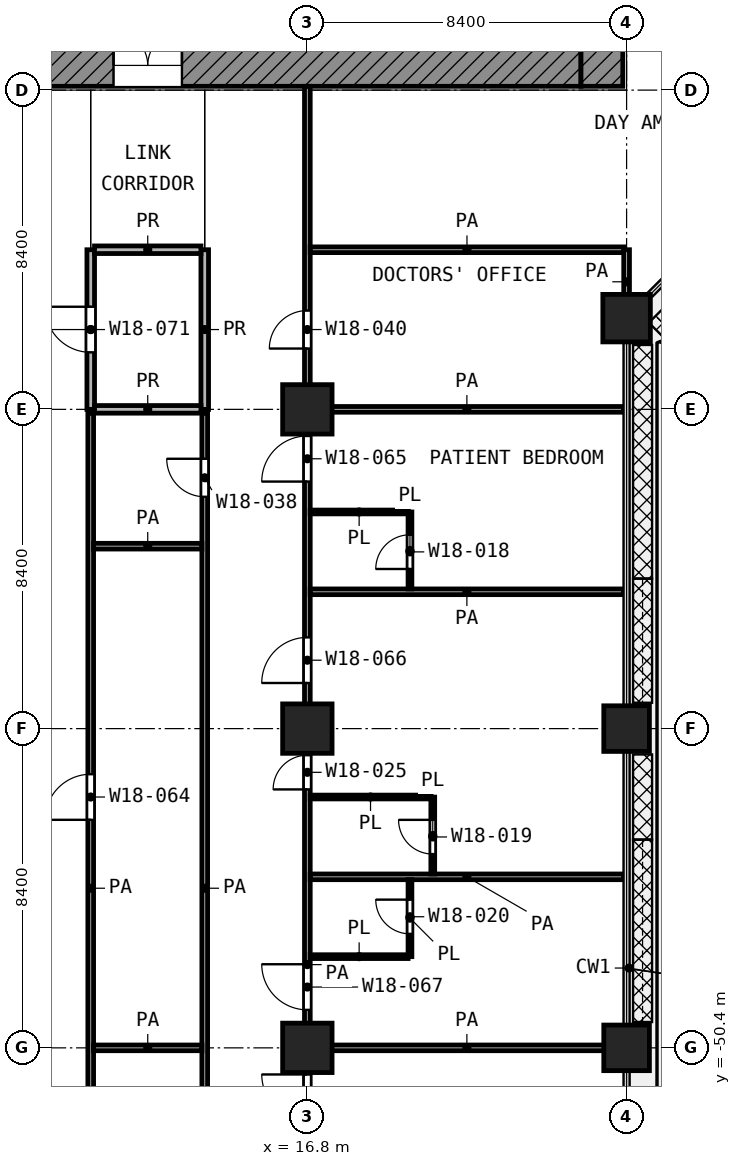
"""IFC4 building model, lengths in metres.
Left out: names, types, materials, properties, quantities, classifications, styles, units other than length and angle.
Written with IfcOpenShell. Run it as: python <this file> out.ifc"""

import sys

from ifc_helpers import new_model, si_unit, direction, frame, frame_2d, origin, origin_2d, place, context, subcontext, project, spatial, rectangle, extrude, element, fill, save


model = new_model("IFC4")
c1 = context("Model", 3, precision=1e-05, world=origin(), true_north=direction((0.0, 1.0)))
c2 = subcontext(c1, "Body", "Model", "MODEL_VIEW")
j1 = project(units=[si_unit("LENGTHUNIT", "METRE"), si_unit("PLANEANGLEUNIT", "RADIAN")], contexts=[c1])
p1 = place(None, origin())
s1 = spatial("IfcSite", under=j1, at=p1, CompositionType="ELEMENT")
p2 = place(p1, origin())
s2 = spatial("IfcBuilding", under=s1, at=p2, CompositionType="ELEMENT")
p3 = place(p2, frame((0.0, 0.0, 81.2)))
s3 = spatial("IfcBuildingStorey", under=s2, at=p3, CompositionType="ELEMENT", Elevation=81.2)
p4 = place(p3, frame((25.2, -31.2, 0.0), z_axis=(0.0, 0.0, 1.0), x_axis=(1.0, 0.0, 0.0)))
e1 = element("IfcColumn", 1, at=p4, inside=s3, PredefinedType="COLUMN", context=c2, shape_type="SweptSolid", body=[
    extrude(rectangle(XDim=1.25, YDim=1.25, at=origin_2d()), origin(), (0.0, 0.0, 1.0), 4.2),
])
for number, where, z_axis, x_axis in (
    (2, (16.8, -33.6, 0.0), (0.0, 0.0, 1.0), (1.0, 0.0, 0.0)),
    (3, (16.8, -42.0, 0.0), (0.0, 0.0, 1.0), (1.0, 0.0, 0.0)),
):
    element("IfcColumn", number, at=place(p3, frame(where, z_axis=z_axis, x_axis=x_axis)), inside=s3, PredefinedType="COLUMN", context=c2, shape_type="SweptSolid", body=[
        extrude(rectangle(XDim=1.3, YDim=1.3, at=origin_2d()), origin(), (0.0, 0.0, 1.0), 4.2),
    ])
p5 = place(p3, frame((25.2, -42.0, 0.0), z_axis=(0.0, 0.0, 1.0), x_axis=(1.0, 0.0, 0.0)))
e4 = element("IfcColumn", 4, at=p5, inside=s3, PredefinedType="COLUMN", context=c2, shape_type="SweptSolid", body=[
    extrude(rectangle(XDim=1.2, YDim=1.2, at=origin_2d()), origin(), (0.0, 0.0, 1.0), 4.2),
])
p6 = place(p3, frame((16.8, -50.4, 0.0), z_axis=(0.0, 0.0, 1.0), x_axis=(1.0, 0.0, 0.0)))
e5 = element("IfcColumn", 5, at=p6, inside=s3, PredefinedType="COLUMN", context=c2, shape_type="SweptSolid", body=[
    extrude(rectangle(XDim=1.3, YDim=1.3, at=origin_2d()), origin(), (0.0, 0.0, 1.0), 4.2),
])
p7 = place(p3, frame((25.2, -50.4, 0.0), z_axis=(0.0, 0.0, 1.0), x_axis=(1.0, 0.0, 0.0)))
e6 = element("IfcColumn", 6, at=p7, inside=s3, PredefinedType="COLUMN", context=c2, shape_type="SweptSolid", body=[
    extrude(rectangle(XDim=1.2, YDim=1.2, at=origin_2d()), origin(), (0.0, 0.0, 1.0), 4.2),
])
p8 = place(p3, frame((5.4, -24.55, 0.0), z_axis=(0.0, 0.0, 1.0), x_axis=(1.0, 0.0, 0.0)))
e7 = element("IfcWall", 7, at=p8, inside=s3, PredefinedType="SHEAR", context=c2, shape_type="SweptSolid", body=[
    extrude(rectangle(XDim=18.6, YDim=1.1, at=frame_2d((9.3, 0.0))), origin(), (0.0, 0.0, 1.0), 3.9),
])
p9 = place(p8, frame((6.3, 0.0, 0.0)))
e8 = element("IfcOpeningElement", 8, at=p9, cuts=e7, PredefinedType="OPENING", context=c2, shape_type="SweptSolid", body=[
    extrude(rectangle(XDim=1.8, YDim=2.1, at=frame_2d((0.9, 1.05))), frame((0.0, 0.56, 0.0), z_axis=(0.0, -1.0, 0.0), x_axis=(1.0, 0.0, 0.0)), (0.0, 0.0, 1.0), 1.12),
])
p10 = place(p3, frame((24.55, -25.1, 0.0), z_axis=(0.0, 0.0, 1.0), x_axis=(0.0, 1.0, 0.0)))
e9 = element("IfcWall", 9, at=p10, inside=s3, PredefinedType="SHEAR", context=c2, shape_type="SweptSolid", body=[
    extrude(rectangle(XDim=1.1, YDim=1.1, at=frame_2d((0.55, 0.0))), origin(), (0.0, 0.0, 1.0), 3.9),
])
p11 = place(p3, frame((16.875, -48.0, 0.0), z_axis=(0.0, 0.0, 1.0), x_axis=(1.0, 0.0, 0.0)))
e10 = element("IfcWall", 10, at=p11, inside=s3, PredefinedType="PARTITIONING", context=c2, shape_type="SweptSolid", body=[
    extrude(rectangle(XDim=2.575, YDim=0.1, at=frame_2d((1.288, 0.0))), origin(), (0.0, 0.0, 1.0), 3.9),
])
p12 = place(p3, frame((16.875, -43.8, 0.0), z_axis=(0.0, 0.0, 1.0), x_axis=(1.0, 0.0, 0.0)))
e11 = element("IfcWall", 11, at=p12, inside=s3, PredefinedType="PARTITIONING", context=c2, shape_type="SweptSolid", body=[
    extrude(rectangle(XDim=3.174, YDim=0.1, at=frame_2d((1.587, 0.0))), origin(), (0.0, 0.0, 1.0), 3.9),
])
p13 = place(p3, frame((16.875, -36.3, 0.0), z_axis=(0.0, 0.0, 1.0), x_axis=(1.0, 0.0, 0.0)))
e12 = element("IfcWall", 12, at=p13, inside=s3, PredefinedType="PARTITIONING", context=c2, shape_type="SweptSolid", body=[
    extrude(rectangle(XDim=2.575, YDim=0.1, at=frame_2d((1.288, 0.0))), origin(), (0.0, 0.0, 1.0), 3.9),
])
p14 = place(p3, frame((19.5, -48.0, 0.0), z_axis=(0.0, 0.0, 1.0), x_axis=(0.0, 1.0, 0.0)))
e13 = element("IfcWall", 13, at=p14, inside=s3, PredefinedType="PARTITIONING", context=c2, shape_type="SweptSolid", body=[
    extrude(rectangle(XDim=2.025, YDim=0.1, at=frame_2d((1.012, 0.0))), origin(), (0.0, 0.0, 1.0), 3.9),
])
p15 = place(p14, frame((0.6, 0.0, 0.0)))
e14 = element("IfcOpeningElement", 14, at=p15, cuts=e13, PredefinedType="OPENING", context=c2, shape_type="SweptSolid", body=[
    extrude(rectangle(XDim=0.9, YDim=2.1, at=frame_2d((0.45, 1.05))), frame((0.0, 0.06, 0.0), z_axis=(0.0, -1.0, 0.0), x_axis=(1.0, 0.0, 0.0)), (0.0, 0.0, 1.0), 0.12),
])
p16 = place(p3, frame((19.5, -38.325, 0.0), z_axis=(0.0, 0.0, 1.0), x_axis=(0.0, 1.0, 0.0)))
e15 = element("IfcWall", 15, at=p16, inside=s3, PredefinedType="PARTITIONING", context=c2, shape_type="SweptSolid", body=[
    extrude(rectangle(XDim=2.025, YDim=0.1, at=frame_2d((1.012, 0.0))), origin(), (0.0, 0.0, 1.0), 3.9),
])
p17 = place(p16, frame((0.525, 0.0, 0.0)))
e16 = element("IfcOpeningElement", 16, at=p17, cuts=e15, PredefinedType="OPENING", context=c2, shape_type="SweptSolid", body=[
    extrude(rectangle(XDim=0.9, YDim=2.1, at=frame_2d((0.45, 1.05))), frame((0.0, 0.06, 0.0), z_axis=(0.0, -1.0, 0.0), x_axis=(1.0, 0.0, 0.0)), (0.0, 0.0, 1.0), 0.12),
])
p18 = place(p3, frame((20.1, -45.825, 0.0), z_axis=(0.0, 0.0, 1.0), x_axis=(0.0, 1.0, 0.0)))
e17 = element("IfcWall", 17, at=p18, inside=s3, PredefinedType="PARTITIONING", context=c2, shape_type="SweptSolid", body=[
    extrude(rectangle(XDim=2.023, YDim=0.1, at=frame_2d((1.011, 0.0))), origin(), (0.0, 0.0, 1.0), 3.9),
])
p19 = place(p18, frame((0.524, 0.0, 0.0)))
e18 = element("IfcOpeningElement", 18, at=p19, cuts=e17, PredefinedType="OPENING", context=c2, shape_type="SweptSolid", body=[
    extrude(rectangle(XDim=0.9, YDim=2.1, at=frame_2d((0.45, 1.05))), frame((0.0, 0.06, 0.0), z_axis=(0.0, -1.0, 0.0), x_axis=(1.0, 0.0, 0.0)), (0.0, 0.0, 1.0), 0.12),
])
p20 = place(p3, frame((11.175, -50.4, 0.0), z_axis=(0.0, 0.0, 1.0), x_axis=(1.0, 0.0, 0.0)))
e19 = element("IfcWall", 19, at=p20, inside=s3, PredefinedType="PARTITIONING", context=c2, shape_type="SweptSolid", body=[
    extrude(rectangle(XDim=2.85, YDim=0.15, at=frame_2d((1.425, 0.0))), origin(), (0.0, 0.0, 1.0), 3.9),
])
for number, where, z_axis, x_axis in (
    (20, (16.875, -50.4, 0.0), (0.0, 0.0, 1.0), (1.0, 0.0, 0.0)),
    (21, (16.875, -45.9, 0.0), (0.0, 0.0, 1.0), (1.0, 0.0, 0.0)),
    (22, (16.875, -38.4, 0.0), (0.0, 0.0, 1.0), (1.0, 0.0, 0.0)),
):
    element("IfcWall", number, at=place(p3, frame(where, z_axis=z_axis, x_axis=x_axis)), inside=s3, PredefinedType="PARTITIONING", context=c2, shape_type="SweptSolid", body=[
        extrude(rectangle(XDim=8.245, YDim=0.15, at=frame_2d((4.123, 0.0))), origin(), (0.0, 0.0, 1.0), 3.9),
    ])
p21 = place(p3, frame((11.175, -37.2, 0.0), z_axis=(0.0, 0.0, 1.0), x_axis=(1.0, 0.0, 0.0)))
e23 = element("IfcWall", 23, at=p21, inside=s3, PredefinedType="PARTITIONING", context=c2, shape_type="SweptSolid", body=[
    extrude(rectangle(XDim=2.85, YDim=0.15, at=frame_2d((1.425, 0.0))), origin(), (0.0, 0.0, 1.0), 3.9),
])
p22 = place(p3, frame((16.875, -33.6, 0.0), z_axis=(0.0, 0.0, 1.0), x_axis=(1.0, 0.0, 0.0)))
e24 = element("IfcWall", 24, at=p22, inside=s3, PredefinedType="PARTITIONING", context=c2, shape_type="SweptSolid", body=[
    extrude(rectangle(XDim=8.245, YDim=0.15, at=frame_2d((4.123, 0.0))), origin(), (0.0, 0.0, 1.0), 3.9),
])
p23 = place(p3, frame((16.875, -29.4, 0.0), z_axis=(0.0, 0.0, 1.0), x_axis=(1.0, 0.0, 0.0)))
e25 = element("IfcWall", 25, at=p23, inside=s3, PredefinedType="PARTITIONING", context=c2, shape_type="SweptSolid", body=[
    extrude(rectangle(XDim=8.25, YDim=0.15, at=frame_2d((4.125, 0.0))), origin(), (0.0, 0.0, 1.0), 3.9),
])
p24 = place(p3, frame((11.1, -58.7, 0.0), z_axis=(0.0, 0.0, 1.0), x_axis=(0.0, 1.0, 0.0)))
e26 = element("IfcWall", 26, at=p24, inside=s3, PredefinedType="PARTITIONING", context=c2, shape_type="SweptSolid", body=[
    extrude(rectangle(XDim=25.0, YDim=0.15, at=frame_2d((12.5, 0.0))), origin(), (0.0, 0.0, 1.0), 3.9),
])
p25 = place(p24, frame((14.3, 0.0, 0.0)))
e27 = element("IfcOpeningElement", 27, at=p25, cuts=e26, PredefinedType="OPENING", context=c2, shape_type="SweptSolid", body=[
    extrude(rectangle(XDim=1.2, YDim=2.1, at=frame_2d((0.6, 1.05))), frame((0.0, 0.085, 0.0), z_axis=(0.0, -1.0, 0.0), x_axis=(1.0, 0.0, 0.0)), (0.0, 0.0, 1.0), 0.17),
])
p26 = place(p24, frame((3.6, 0.0, 0.0)))
e28 = element("IfcOpeningElement", 28, at=p26, cuts=e26, PredefinedType="OPENING", context=c2, shape_type="SweptSolid", body=[
    extrude(rectangle(XDim=1.0, YDim=2.1, at=frame_2d((0.5, 1.05))), frame((0.0, 0.085, 0.0), z_axis=(0.0, -1.0, 0.0), x_axis=(1.0, 0.0, 0.0)), (0.0, 0.0, 1.0), 0.17),
])
p27 = place(p3, frame((14.1, -58.7, 0.0), z_axis=(0.0, 0.0, 1.0), x_axis=(0.0, 1.0, 0.0)))
e29 = element("IfcWall", 29, at=p27, inside=s3, PredefinedType="PARTITIONING", context=c2, shape_type="SweptSolid", body=[
    extrude(rectangle(XDim=25.0, YDim=0.15, at=frame_2d((12.5, 0.0))), origin(), (0.0, 0.0, 1.0), 3.9),
])
p28 = place(p27, frame((22.8, 0.0, 0.0)))
e30 = element("IfcOpeningElement", 30, at=p28, cuts=e29, PredefinedType="OPENING", context=c2, shape_type="SweptSolid", body=[
    extrude(rectangle(XDim=1.0, YDim=2.1, at=frame_2d((0.5, 1.05))), frame((0.0, 0.085, 0.0), z_axis=(0.0, -1.0, 0.0), x_axis=(1.0, 0.0, 0.0)), (0.0, 0.0, 1.0), 0.17),
])
p29 = place(p3, frame((16.8, -71.32, 0.0), z_axis=(0.0, 0.0, 1.0), x_axis=(0.0, 1.0, 0.0)))
e31 = element("IfcWall", 31, at=p29, inside=s3, PredefinedType="PARTITIONING", context=c2, shape_type="SweptSolid", body=[
    extrude(rectangle(XDim=46.22, YDim=0.15, at=frame_2d((23.11, 0.0))), origin(), (0.0, 0.0, 1.0), 3.9),
])
p30 = place(p29, frame((39.32, 0.0, 0.0)))
e32 = element("IfcOpeningElement", 32, at=p30, cuts=e31, PredefinedType="OPENING", context=c2, shape_type="SweptSolid", body=[
    extrude(rectangle(XDim=1.0, YDim=2.1, at=frame_2d((0.5, 1.05))), frame((0.0, 0.085, 0.0), z_axis=(0.0, -1.0, 0.0), x_axis=(1.0, 0.0, 0.0)), (0.0, 0.0, 1.0), 0.17),
])
p31 = place(p29, frame((35.82, 0.0, 0.0)))
e33 = element("IfcOpeningElement", 33, at=p31, cuts=e31, PredefinedType="OPENING", context=c2, shape_type="SweptSolid", body=[
    extrude(rectangle(XDim=1.2, YDim=2.1, at=frame_2d((0.6, 1.05))), frame((0.0, 0.085, 0.0), z_axis=(0.0, -1.0, 0.0), x_axis=(1.0, 0.0, 0.0)), (0.0, 0.0, 1.0), 0.17),
])
p32 = place(p29, frame((30.52, 0.0, 0.0)))
e34 = element("IfcOpeningElement", 34, at=p32, cuts=e31, PredefinedType="OPENING", context=c2, shape_type="SweptSolid", body=[
    extrude(rectangle(XDim=1.2, YDim=2.1, at=frame_2d((0.6, 1.05))), frame((0.0, 0.085, 0.0), z_axis=(0.0, -1.0, 0.0), x_axis=(1.0, 0.0, 0.0)), (0.0, 0.0, 1.0), 0.17),
])
p33 = place(p29, frame((27.72, 0.0, 0.0)))
e35 = element("IfcOpeningElement", 35, at=p33, cuts=e31, PredefinedType="OPENING", context=c2, shape_type="SweptSolid", body=[
    extrude(rectangle(XDim=0.9, YDim=2.1, at=frame_2d((0.45, 1.05))), frame((0.0, 0.085, 0.0), z_axis=(0.0, -1.0, 0.0), x_axis=(1.0, 0.0, 0.0)), (0.0, 0.0, 1.0), 0.17),
])
p34 = place(p29, frame((21.92, 0.0, 0.0)))
e36 = element("IfcOpeningElement", 36, at=p34, cuts=e31, PredefinedType="OPENING", context=c2, shape_type="SweptSolid", body=[
    extrude(rectangle(XDim=1.2, YDim=2.1, at=frame_2d((0.6, 1.05))), frame((0.0, 0.085, 0.0), z_axis=(0.0, -1.0, 0.0), x_axis=(1.0, 0.0, 0.0)), (0.0, 0.0, 1.0), 0.17),
])
p35 = place(p29, frame((19.02, 0.0, 0.0)))
e37 = element("IfcOpeningElement", 37, at=p35, cuts=e31, PredefinedType="OPENING", context=c2, shape_type="SweptSolid", body=[
    extrude(rectangle(XDim=1.2, YDim=2.1, at=frame_2d((0.6, 1.05))), frame((0.0, 0.085, 0.0), z_axis=(0.0, -1.0, 0.0), x_axis=(1.0, 0.0, 0.0)), (0.0, 0.0, 1.0), 0.17),
])
p36 = place(p29, frame((10.62, 0.0, 0.0)))
e38 = element("IfcOpeningElement", 38, at=p36, cuts=e31, PredefinedType="OPENING", context=c2, shape_type="SweptSolid", body=[
    extrude(rectangle(XDim=1.2, YDim=2.1, at=frame_2d((0.6, 1.05))), frame((0.0, 0.085, 0.0), z_axis=(0.0, -1.0, 0.0), x_axis=(1.0, 0.0, 0.0)), (0.0, 0.0, 1.0), 0.17),
])
p37 = place(p29, frame((9.17, 0.0, 0.0)))
e39 = element("IfcOpeningElement", 39, at=p37, cuts=e31, PredefinedType="OPENING", context=c2, shape_type="SweptSolid", body=[
    extrude(rectangle(XDim=1.1, YDim=2.1, at=frame_2d((0.55, 1.05))), frame((0.0, 0.085, 0.0), z_axis=(0.0, -1.0, 0.0), x_axis=(1.0, 0.0, 0.0)), (0.0, 0.0, 1.0), 0.17),
])
p38 = place(p29, frame((5.32, 0.0, 0.0)))
e40 = element("IfcOpeningElement", 40, at=p38, cuts=e31, PredefinedType="OPENING", context=c2, shape_type="SweptSolid", body=[
    extrude(rectangle(XDim=1.2, YDim=2.1, at=frame_2d((0.6, 1.05))), frame((0.0, 0.085, 0.0), z_axis=(0.0, -1.0, 0.0), x_axis=(1.0, 0.0, 0.0)), (0.0, 0.0, 1.0), 0.17),
])
p39 = place(p29, frame((1.52, 0.0, 0.0)))
e41 = element("IfcOpeningElement", 41, at=p39, cuts=e31, PredefinedType="OPENING", context=c2, shape_type="SweptSolid", body=[
    extrude(rectangle(XDim=1.0, YDim=2.1, at=frame_2d((0.5, 1.05))), frame((0.0, 0.085, 0.0), z_axis=(0.0, -1.0, 0.0), x_axis=(1.0, 0.0, 0.0)), (0.0, 0.0, 1.0), 0.17),
])
p40 = place(p3, frame((25.2, -31.087, 0.0), z_axis=(0.0, 0.0, 1.0), x_axis=(0.0, 1.0, 0.0)))
e42 = element("IfcWall", 42, at=p40, inside=s3, PredefinedType="PARTITIONING", context=c2, shape_type="SweptSolid", body=[
    extrude(rectangle(XDim=1.687, YDim=0.15, at=frame_2d((0.844, 0.0))), origin(), (0.0, 0.0, 1.0), 3.9),
])
for number, where, z_axis, x_axis in (
    (43, (11.2, -33.6, 0.0), (0.0, 0.0, 1.0), (1.0, 0.0, 0.0)),
    (44, (11.2, -29.4, 0.0), (0.0, 0.0, 1.0), (1.0, 0.0, 0.0)),
):
    element("IfcWall", number, at=place(p3, frame(where, z_axis=z_axis, x_axis=x_axis)), inside=s3, PredefinedType="PARTITIONING", context=c2, shape_type="SweptSolid", body=[
        extrude(rectangle(XDim=2.8, YDim=0.2, at=frame_2d((1.4, 0.0))), origin(), (0.0, 0.0, 1.0), 3.9),
    ])
p41 = place(p3, frame((11.1, -33.6, 0.0), z_axis=(0.0, 0.0, 1.0), x_axis=(0.0, 1.0, 0.0)))
e45 = element("IfcWall", 45, at=p41, inside=s3, PredefinedType="PARTITIONING", context=c2, shape_type="SweptSolid", body=[
    extrude(rectangle(XDim=4.2, YDim=0.2, at=frame_2d((2.1, 0.0))), origin(), (0.0, 0.0, 1.0), 3.9),
])
p42 = place(p41, frame((1.5, 0.0, 0.0)))
e46 = element("IfcOpeningElement", 46, at=p42, cuts=e45, PredefinedType="OPENING", context=c2, shape_type="SweptSolid", body=[
    extrude(rectangle(XDim=1.2, YDim=2.1, at=frame_2d((0.6, 1.05))), frame((0.0, 0.11, 0.0), z_axis=(0.0, -1.0, 0.0), x_axis=(1.0, 0.0, 0.0)), (0.0, 0.0, 1.0), 0.22),
])
p43 = place(p3, frame((14.1, -33.6, 0.0), z_axis=(0.0, 0.0, 1.0), x_axis=(0.0, 1.0, 0.0)))
e47 = element("IfcWall", 47, at=p43, inside=s3, PredefinedType="PARTITIONING", context=c2, shape_type="SweptSolid", body=[
    extrude(rectangle(XDim=4.2, YDim=0.2, at=frame_2d((2.1, 0.0))), origin(), (0.0, 0.0, 1.0), 3.9),
])
p44 = place(p9, origin())
e48 = element("IfcDoor", 48, at=p44, inside=s3, OperationType="DOUBLE_DOOR_SINGLE_SWING", PredefinedType="DOOR", context=c2, shape_type="SweptSolid", body=[
    extrude(rectangle(XDim=1.8, YDim=2.1, at=frame_2d((0.9, 1.05))), frame((0.0, 0.025, 0.0), z_axis=(0.0, -1.0, 0.0), x_axis=(1.0, 0.0, 0.0)), (0.0, 0.0, 1.0), 0.05),
])
fill(e8, e48)
p45 = place(p42, origin())
e49 = element("IfcDoor", 49, at=p45, inside=s3, OperationType="SINGLE_SWING_RIGHT", PredefinedType="DOOR", context=c2, shape_type="SweptSolid", body=[
    extrude(rectangle(XDim=1.2, YDim=2.1, at=frame_2d((0.6, 1.05))), frame((0.0, 0.025, 0.0), z_axis=(0.0, -1.0, 0.0), x_axis=(1.0, 0.0, 0.0)), (0.0, 0.0, 1.0), 0.05),
])
fill(e46, e49)
p46 = place(p28, origin())
e50 = element("IfcDoor", 50, at=p46, inside=s3, OperationType="SINGLE_SWING_RIGHT", PredefinedType="DOOR", context=c2, shape_type="SweptSolid", body=[
    extrude(rectangle(XDim=1.0, YDim=2.1, at=frame_2d((0.5, 1.05))), frame((0.0, 0.025, 0.0), z_axis=(0.0, -1.0, 0.0), x_axis=(1.0, 0.0, 0.0)), (0.0, 0.0, 1.0), 0.05),
])
fill(e30, e50)
p47 = place(p25, origin())
e51 = element("IfcDoor", 51, at=p47, inside=s3, OperationType="SINGLE_SWING_LEFT", PredefinedType="DOOR", context=c2, shape_type="SweptSolid", body=[
    extrude(rectangle(XDim=1.2, YDim=2.1, at=frame_2d((0.6, 1.05))), frame((0.0, 0.025, 0.0), z_axis=(0.0, -1.0, 0.0), x_axis=(1.0, 0.0, 0.0)), (0.0, 0.0, 1.0), 0.05),
])
fill(e27, e51)
p48 = place(p30, origin())
e52 = element("IfcDoor", 52, at=p48, inside=s3, OperationType="SINGLE_SWING_LEFT", PredefinedType="DOOR", context=c2, shape_type="SweptSolid", body=[
    extrude(rectangle(XDim=1.0, YDim=2.1, at=frame_2d((0.5, 1.05))), frame((0.0, 0.025, 0.0), z_axis=(0.0, -1.0, 0.0), x_axis=(1.0, 0.0, 0.0)), (0.0, 0.0, 1.0), 0.05),
])
fill(e32, e52)
p49 = place(p31, origin())
e53 = element("IfcDoor", 53, at=p49, inside=s3, OperationType="SINGLE_SWING_LEFT", PredefinedType="DOOR", context=c2, shape_type="SweptSolid", body=[
    extrude(rectangle(XDim=1.2, YDim=2.1, at=frame_2d((0.6, 1.05))), frame((0.0, 0.025, 0.0), z_axis=(0.0, -1.0, 0.0), x_axis=(1.0, 0.0, 0.0)), (0.0, 0.0, 1.0), 0.05),
])
fill(e33, e53)
p50 = place(p17, origin())
e54 = element("IfcDoor", 54, at=p50, inside=s3, OperationType="SINGLE_SWING_LEFT", PredefinedType="DOOR", context=c2, shape_type="SweptSolid", body=[
    extrude(rectangle(XDim=0.9, YDim=2.1, at=frame_2d((0.45, 1.05))), frame((0.0, 0.025, 0.0), z_axis=(0.0, -1.0, 0.0), x_axis=(1.0, 0.0, 0.0)), (0.0, 0.0, 1.0), 0.05),
])
fill(e16, e54)
p51 = place(p32, origin())
e55 = element("IfcDoor", 55, at=p51, inside=s3, OperationType="SINGLE_SWING_LEFT", PredefinedType="DOOR", context=c2, shape_type="SweptSolid", body=[
    extrude(rectangle(XDim=1.2, YDim=2.1, at=frame_2d((0.6, 1.05))), frame((0.0, 0.025, 0.0), z_axis=(0.0, -1.0, 0.0), x_axis=(1.0, 0.0, 0.0)), (0.0, 0.0, 1.0), 0.05),
])
fill(e34, e55)
p52 = place(p33, origin())
e56 = element("IfcDoor", 56, at=p52, inside=s3, OperationType="SINGLE_SWING_LEFT", PredefinedType="DOOR", context=c2, shape_type="SweptSolid", body=[
    extrude(rectangle(XDim=0.9, YDim=2.1, at=frame_2d((0.45, 1.05))), frame((0.0, 0.025, 0.0), z_axis=(0.0, -1.0, 0.0), x_axis=(1.0, 0.0, 0.0)), (0.0, 0.0, 1.0), 0.05),
])
fill(e35, e56)
p53 = place(p19, origin())
e57 = element("IfcDoor", 57, at=p53, inside=s3, OperationType="SINGLE_SWING_RIGHT", PredefinedType="DOOR", context=c2, shape_type="SweptSolid", body=[
    extrude(rectangle(XDim=0.9, YDim=2.1, at=frame_2d((0.45, 1.05))), frame((0.0, 0.025, 0.0), z_axis=(0.0, -1.0, 0.0), x_axis=(1.0, 0.0, 0.0)), (0.0, 0.0, 1.0), 0.05),
])
fill(e18, e57)
p54 = place(p34, origin())
e58 = element("IfcDoor", 58, at=p54, inside=s3, OperationType="SINGLE_SWING_RIGHT", PredefinedType="DOOR", context=c2, shape_type="SweptSolid", body=[
    extrude(rectangle(XDim=1.2, YDim=2.1, at=frame_2d((0.6, 1.05))), frame((0.0, 0.025, 0.0), z_axis=(0.0, -1.0, 0.0), x_axis=(1.0, 0.0, 0.0)), (0.0, 0.0, 1.0), 0.05),
])
fill(e36, e58)
p55 = place(p15, origin())
e59 = element("IfcDoor", 59, at=p55, inside=s3, OperationType="SINGLE_SWING_RIGHT", PredefinedType="DOOR", context=c2, shape_type="SweptSolid", body=[
    extrude(rectangle(XDim=0.9, YDim=2.1, at=frame_2d((0.45, 1.05))), frame((0.0, 0.025, 0.0), z_axis=(0.0, -1.0, 0.0), x_axis=(1.0, 0.0, 0.0)), (0.0, 0.0, 1.0), 0.05),
])
fill(e14, e59)
p56 = place(p35, origin())
e60 = element("IfcDoor", 60, at=p56, inside=s3, OperationType="SINGLE_SWING_RIGHT", PredefinedType="DOOR", context=c2, shape_type="SweptSolid", body=[
    extrude(rectangle(XDim=1.2, YDim=2.1, at=frame_2d((0.6, 1.05))), frame((0.0, 0.025, 0.0), z_axis=(0.0, -1.0, 0.0), x_axis=(1.0, 0.0, 0.0)), (0.0, 0.0, 1.0), 0.05),
])
fill(e37, e60)
save(model, sys.argv[1])
